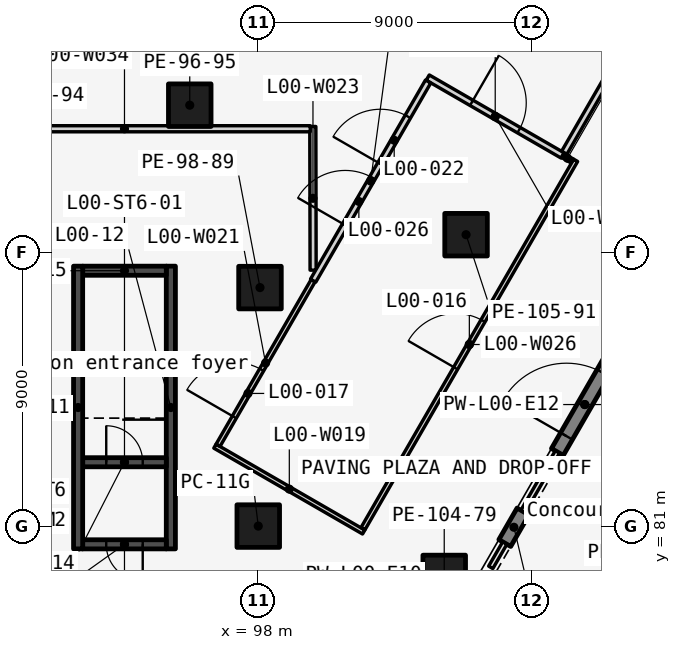
"""IFC4 building model, lengths in metres.
Left out: names, types, materials, properties, quantities, classifications, styles, units other than length and angle.
Written with IfcOpenShell. Run it as: python <this file> out.ifc"""

import sys

from ifc_helpers import new_model, si_unit, direction, frame, frame_2d, origin, origin_2d, place, context, subcontext, project, spatial, rectangle, extrude, element, fill, save


model = new_model("IFC4")
c1 = context("Model", 3, precision=1e-05, world=origin(), true_north=direction((0.0, 1.0)))
c2 = subcontext(c1, "Body", "Model", "MODEL_VIEW")
j1 = project(units=[si_unit("LENGTHUNIT", "METRE"), si_unit("PLANEANGLEUNIT", "RADIAN")], contexts=[c1])
p1 = place(None, origin())
s1 = spatial("IfcSite", under=j1, at=p1, CompositionType="ELEMENT")
p2 = place(p1, origin())
s2 = spatial("IfcBuilding", under=s1, at=p2, CompositionType="ELEMENT")
p3 = place(p2, origin())
s3 = spatial("IfcBuildingStorey", under=s2, at=p3, CompositionType="ELEMENT", Elevation=0.0)
for number, where, z_axis, x_axis in (
    (1, (98.0, 81.0, 0.0), (0.0, 0.0, 1.0), (1.0, 0.0, 0.0)),
    (2, (104.117, 79.343, 0.0), (0.0, 0.0, 1.0), (1.0, 0.0, 0.0)),
    (3, (104.835, 90.585, 0.0), (0.0, 0.0, 1.0), (1.0, 0.0, 0.0)),
    (4, (95.747, 94.845, 0.0), (0.0, 0.0, 1.0), (1.0, 0.0, 0.0)),
    (5, (98.057, 88.845, 0.0), (0.0, 0.0, 1.0), (1.0, 0.0, 0.0)),
):
    element("IfcColumn", number, at=place(p3, frame(where, z_axis=z_axis, x_axis=x_axis)), inside=s3, PredefinedType="COLUMN", context=c2, shape_type="SweptSolid", body=[
        extrude(rectangle(XDim=1.4, YDim=1.4, at=origin_2d()), origin(), (0.0, 0.0, 1.0), 7.5),
    ])
for number, where, z_axis, x_axis in (
    (6, (92.075, 80.25, 0.0), (0.0, 0.0, 1.0), (0.0, 1.0, 0.0)),
    (7, (95.125, 80.25, 0.0), (0.0, 0.0, 1.0), (0.0, 1.0, 0.0)),
):
    element("IfcWall", number, at=place(p3, frame(where, z_axis=z_axis, x_axis=x_axis)), inside=s3, PredefinedType="SOLIDWALL", context=c2, shape_type="SweptSolid", body=[
        extrude(rectangle(XDim=9.3, YDim=0.3, at=frame_2d((4.65, 0.0))), origin(), (0.0, 0.0, 1.0), 7.2),
    ])
p4 = place(p3, frame((92.225, 80.4, 0.0), z_axis=(0.0, 0.0, 1.0), x_axis=(1.0, 0.0, 0.0)))
e8 = element("IfcWall", 8, at=p4, inside=s3, PredefinedType="SOLIDWALL", context=c2, shape_type="SweptSolid", body=[
    extrude(rectangle(XDim=2.75, YDim=0.3, at=frame_2d((1.375, 0.0))), origin(), (0.0, 0.0, 1.0), 7.2),
])
p5 = place(p4, frame((0.775, 0.0, 0.0)))
e9 = element("IfcOpeningElement", 9, at=p5, cuts=e8, PredefinedType="OPENING", context=c2, shape_type="SweptSolid", body=[
    extrude(rectangle(XDim=1.2, YDim=2.1, at=frame_2d((0.6, 1.05))), frame((0.0, 0.16, 0.0), z_axis=(0.0, -1.0, 0.0), x_axis=(1.0, 0.0, 0.0)), (0.0, 0.0, 1.0), 0.32),
])
p6 = place(p3, frame((92.225, 83.1, 0.0), z_axis=(0.0, 0.0, 1.0), x_axis=(1.0, 0.0, 0.0)))
e10 = element("IfcWall", 10, at=p6, inside=s3, PredefinedType="SOLIDWALL", context=c2, shape_type="SweptSolid", body=[
    extrude(rectangle(XDim=2.75, YDim=0.3, at=frame_2d((1.375, 0.0))), origin(), (0.0, 0.0, 1.0), 7.2),
])
p7 = place(p6, frame((0.775, 0.0, 0.0)))
e11 = element("IfcOpeningElement", 11, at=p7, cuts=e10, PredefinedType="OPENING", context=c2, shape_type="SweptSolid", body=[
    extrude(rectangle(XDim=1.2, YDim=2.1, at=frame_2d((0.6, 1.05))), frame((0.0, 0.16, 0.0), z_axis=(0.0, -1.0, 0.0), x_axis=(1.0, 0.0, 0.0)), (0.0, 0.0, 1.0), 0.32),
])
p8 = place(p3, frame((92.225, 89.4, 0.0), z_axis=(0.0, 0.0, 1.0), x_axis=(1.0, 0.0, 0.0)))
e12 = element("IfcWall", 12, at=p8, inside=s3, PredefinedType="SOLIDWALL", context=c2, shape_type="SweptSolid", body=[
    extrude(rectangle(XDim=2.75, YDim=0.3, at=frame_2d((1.375, 0.0))), origin(), (0.0, 0.0, 1.0), 7.2),
])
p9 = place(p3, frame((106.109, 80.442, -0.3), z_axis=(0.0, 0.0, 1.0), x_axis=(0.499880961361, 0.866094119867, 0.0)))
e13 = element("IfcWall", 13, at=p9, inside=s3, PredefinedType="SOLIDWALL", context=c2, shape_type="SweptSolid", body=[
    extrude(rectangle(XDim=1.2, YDim=0.45, at=frame_2d((0.6, 0.0))), origin(), (0.0, 0.0, 1.0), 6.812),
])
p10 = place(p3, frame((107.839, 83.439, -0.3), z_axis=(0.0, 0.0, 1.0), x_axis=(0.500012057535, 0.866018442252, 0.0)))
e14 = element("IfcWall", 14, at=p10, inside=s3, PredefinedType="SOLIDWALL", context=c2, shape_type="SweptSolid", body=[
    extrude(rectangle(XDim=3.6, YDim=0.45, at=frame_2d((1.8, 0.0))), origin(), (0.0, 0.0, 1.0), 6.812),
])
p11 = place(p10, frame((0.6, 0.0, 0.3)))
e15 = element("IfcOpeningElement", 15, at=p11, cuts=e14, PredefinedType="OPENING", context=c2, shape_type="SweptSolid", body=[
    extrude(rectangle(XDim=2.4, YDim=3.0, at=frame_2d((1.2, 1.5))), frame((0.0, 0.235, 0.0), z_axis=(0.0, -1.0, 0.0), x_axis=(1.0, 0.0, 0.0)), (0.0, 0.0, 1.0), 0.47),
])
p12 = place(p3, frame((96.575, 83.629, 0.0), z_axis=(0.0, 0.0, 1.0), x_axis=(0.86603015807, -0.499991765245, 0.0)))
e16 = element("IfcWall", 16, at=p12, inside=s3, PredefinedType="PARTITIONING", context=c2, shape_type="SweptSolid", body=[
    extrude(rectangle(XDim=5.65, YDim=0.15, at=frame_2d((2.825, 0.0))), origin(), (0.0, 0.0, 1.0), 7.2),
])
p13 = place(p3, frame((96.677, 83.656, 0.0), z_axis=(0.0, 0.0, 1.0), x_axis=(0.499988219145, 0.866032205357, 0.0)))
e17 = element("IfcWall", 17, at=p13, inside=s3, PredefinedType="PARTITIONING", context=c2, shape_type="SweptSolid", body=[
    extrude(rectangle(XDim=6.256, YDim=0.15, at=frame_2d((3.128, 0.0))), origin(), (0.0, 0.0, 1.0), 7.2),
])
p14 = place(p13, frame((1.071, 0.0, 0.0)))
e18 = element("IfcOpeningElement", 18, at=p14, cuts=e17, PredefinedType="OPENING", context=c2, shape_type="SweptSolid", body=[
    extrude(rectangle(XDim=1.8, YDim=2.1, at=frame_2d((0.9, 1.05))), frame((0.0, 0.085, 0.0), z_axis=(0.0, -1.0, 0.0), x_axis=(1.0, 0.0, 0.0)), (0.0, 0.0, 1.0), 0.17),
])
p15 = place(p3, frame((99.804, 89.419, 0.0), z_axis=(0.0, 0.0, 1.0), x_axis=(-0.001963110336, 0.999998073097, 0.0)))
e19 = element("IfcWall", 19, at=p15, inside=s3, PredefinedType="PARTITIONING", context=c2, shape_type="SweptSolid", body=[
    extrude(rectangle(XDim=4.726, YDim=0.2, at=frame_2d((2.363, 0.0))), origin(), (0.0, 0.0, 1.0), 7.2),
])
p16 = place(p3, frame((101.445, 80.915, 0.0), z_axis=(0.0, 0.0, 1.0), x_axis=(0.500005438691, 0.866022263732, 0.0)))
e20 = element("IfcWall", 20, at=p16, inside=s3, PredefinedType="PARTITIONING", context=c2, shape_type="SweptSolid", body=[
    extrude(rectangle(XDim=13.99, YDim=0.15, at=frame_2d((6.995, 0.0))), origin(), (0.0, 0.0, 1.0), 7.2),
])
p17 = place(p16, frame((6.095, 0.0, 0.0)))
e21 = element("IfcOpeningElement", 21, at=p17, cuts=e20, PredefinedType="OPENING", context=c2, shape_type="SweptSolid", body=[
    extrude(rectangle(XDim=1.8, YDim=2.1, at=frame_2d((0.9, 1.05))), frame((0.0, 0.085, 0.0), z_axis=(0.0, -1.0, 0.0), x_axis=(1.0, 0.0, 0.0)), (0.0, 0.0, 1.0), 0.17),
])
p18 = place(p3, frame((103.575, 95.753, 0.0), z_axis=(0.0, 0.0, 1.0), x_axis=(0.866026913713, -0.499997384719, 0.0)))
e22 = element("IfcWall", 22, at=p18, inside=s3, PredefinedType="PARTITIONING", context=c2, shape_type="SweptSolid", body=[
    extrude(rectangle(XDim=5.125, YDim=0.2, at=frame_2d((2.562, 0.0))), origin(), (0.0, 0.0, 1.0), 7.2),
])
p19 = place(p18, frame((1.662, 0.0, 0.0)))
e23 = element("IfcOpeningElement", 23, at=p19, cuts=e22, PredefinedType="OPENING", context=c2, shape_type="SweptSolid", body=[
    extrude(rectangle(XDim=1.8, YDim=2.1, at=frame_2d((0.9, 1.05))), frame((0.0, 0.11, 0.0), z_axis=(0.0, -1.0, 0.0), x_axis=(1.0, 0.0, 0.0)), (0.0, 0.0, 1.0), 0.22),
])
p20 = place(p3, frame((108.013, 93.191, 0.0), z_axis=(0.0, 0.0, 1.0), x_axis=(0.866218991742, -0.499664545816, 0.0)))
e24 = element("IfcWall", 24, at=p20, inside=s3, PredefinedType="PARTITIONING", context=c2, shape_type="SweptSolid", body=[
    extrude(rectangle(XDim=0.365, YDim=0.15, at=frame_2d((0.183, 0.0))), origin(), (0.0, 0.0, 1.0), 7.2),
])
p21 = place(p3, frame((87.49, 94.07, 0.0), z_axis=(0.0, 0.0, 1.0), x_axis=(1.0, 0.0, 0.0)))
e25 = element("IfcWall", 25, at=p21, inside=s3, PredefinedType="PARTITIONING", context=c2, shape_type="SweptSolid", body=[
    extrude(rectangle(XDim=12.22, YDim=0.2, at=frame_2d((6.11, 0.0))), origin(), (0.0, 0.0, 1.0), 7.2),
])
p22 = place(p3, frame((99.805, 89.074, 0.0), z_axis=(0.0, 0.0, 1.0), x_axis=(0.500061423056, 0.865989938262, 0.0)))
e26 = element("IfcWall", 26, at=p22, inside=s3, PredefinedType="PARTITIONING", context=c2, shape_type="SweptSolid", body=[
    extrude(rectangle(XDim=7.564, YDim=0.2, at=frame_2d((3.782, 0.0))), origin(), (0.0, 0.0, 1.0), 7.2),
])
p23 = place(p22, frame((4.432, 0.0, 0.0)))
e27 = element("IfcOpeningElement", 27, at=p23, cuts=e26, PredefinedType="OPENING", context=c2, shape_type="SweptSolid", body=[
    extrude(rectangle(XDim=1.8, YDim=2.1, at=frame_2d((0.9, 1.05))), frame((0.0, 0.11, 0.0), z_axis=(0.0, -1.0, 0.0), x_axis=(1.0, 0.0, 0.0)), (0.0, 0.0, 1.0), 0.22),
])
p24 = place(p22, frame((2.108, 0.0, 0.0)))
e28 = element("IfcOpeningElement", 28, at=p24, cuts=e26, PredefinedType="OPENING", context=c2, shape_type="SweptSolid", body=[
    extrude(rectangle(XDim=1.8, YDim=2.1, at=frame_2d((0.9, 1.05))), frame((0.0, 0.11, 0.0), z_axis=(0.0, -1.0, 0.0), x_axis=(1.0, 0.0, 0.0)), (0.0, 0.0, 1.0), 0.22),
])
p25 = place(p3, frame((108.066, 93.282, 0.0), z_axis=(0.0, 0.0, 1.0), x_axis=(0.500000136489, 0.866025324982, 0.0)))
e29 = element("IfcWall", 29, at=p25, inside=s3, PredefinedType="PARTITIONING", context=c2, shape_type="SweptSolid", body=[
    extrude(rectangle(XDim=25.496, YDim=0.2, at=frame_2d((12.748, 0.0))), origin(), (0.0, 0.0, 1.0), 7.2),
])
p26 = place(p7, origin())
e30 = element("IfcDoor", 30, at=p26, inside=s3, OperationType="SINGLE_SWING_LEFT", PredefinedType="DOOR", context=c2, shape_type="SweptSolid", body=[
    extrude(rectangle(XDim=1.2, YDim=2.1, at=frame_2d((0.6, 1.05))), frame((0.0, 0.025, 0.0), z_axis=(0.0, -1.0, 0.0), x_axis=(1.0, 0.0, 0.0)), (0.0, 0.0, 1.0), 0.05),
])
fill(e11, e30)
p27 = place(p5, origin())
e31 = element("IfcDoor", 31, at=p27, inside=s3, OperationType="SINGLE_SWING_RIGHT", PredefinedType="DOOR", context=c2, shape_type="SweptSolid", body=[
    extrude(rectangle(XDim=1.2, YDim=2.1, at=frame_2d((0.6, 1.05))), frame((0.0, 0.025, 0.0), z_axis=(0.0, -1.0, 0.0), x_axis=(1.0, 0.0, 0.0)), (0.0, 0.0, 1.0), 0.05),
])
fill(e9, e31)
p28 = place(p11, origin())
e32 = element("IfcDoor", 32, at=p28, inside=s3, OperationType="DOUBLE_DOOR_SINGLE_SWING", PredefinedType="DOOR", context=c2, shape_type="SweptSolid", body=[
    extrude(rectangle(XDim=2.4, YDim=3.0, at=frame_2d((1.2, 1.5))), frame((0.0, 0.025, 0.0), z_axis=(0.0, -1.0, 0.0), x_axis=(1.0, 0.0, 0.0)), (0.0, 0.0, 1.0), 0.05),
])
fill(e15, e32)
p29 = place(p17, origin())
e33 = element("IfcDoor", 33, at=p29, inside=s3, OperationType="SINGLE_SWING_LEFT", PredefinedType="DOOR", context=c2, shape_type="SweptSolid", body=[
    extrude(rectangle(XDim=1.8, YDim=2.1, at=frame_2d((0.9, 1.05))), frame((0.0, 0.025, 0.0), z_axis=(0.0, -1.0, 0.0), x_axis=(1.0, 0.0, 0.0)), (0.0, 0.0, 1.0), 0.05),
])
fill(e21, e33)
p30 = place(p14, origin())
e34 = element("IfcDoor", 34, at=p30, inside=s3, OperationType="SINGLE_SWING_LEFT", PredefinedType="DOOR", context=c2, shape_type="SweptSolid", body=[
    extrude(rectangle(XDim=1.8, YDim=2.1, at=frame_2d((0.9, 1.05))), frame((0.0, 0.025, 0.0), z_axis=(0.0, -1.0, 0.0), x_axis=(1.0, 0.0, 0.0)), (0.0, 0.0, 1.0), 0.05),
])
fill(e18, e34)
p31 = place(p23, origin())
e35 = element("IfcDoor", 35, at=p31, inside=s3, OperationType="SINGLE_SWING_LEFT", PredefinedType="DOOR", context=c2, shape_type="SweptSolid", body=[
    extrude(rectangle(XDim=1.8, YDim=2.1, at=frame_2d((0.9, 1.05))), frame((0.0, 0.025, 0.0), z_axis=(0.0, -1.0, 0.0), x_axis=(1.0, 0.0, 0.0)), (0.0, 0.0, 1.0), 0.05),
])
fill(e27, e35)
p32 = place(p19, origin())
e36 = element("IfcDoor", 36, at=p32, inside=s3, OperationType="SINGLE_SWING_LEFT", PredefinedType="DOOR", context=c2, shape_type="SweptSolid", body=[
    extrude(rectangle(XDim=1.8, YDim=2.1, at=frame_2d((0.9, 1.05))), frame((0.0, 0.025, 0.0), z_axis=(0.0, -1.0, 0.0), x_axis=(1.0, 0.0, 0.0)), (0.0, 0.0, 1.0), 0.05),
])
fill(e23, e36)
p33 = place(p24, origin())
e37 = element("IfcDoor", 37, at=p33, inside=s3, OperationType="SINGLE_SWING_LEFT", PredefinedType="DOOR", context=c2, shape_type="SweptSolid", body=[
    extrude(rectangle(XDim=1.8, YDim=2.1, at=frame_2d((0.9, 1.05))), frame((0.0, 0.025, 0.0), z_axis=(0.0, -1.0, 0.0), x_axis=(1.0, 0.0, 0.0)), (0.0, 0.0, 1.0), 0.05),
])
fill(e28, e37)
save(model, sys.argv[1])
